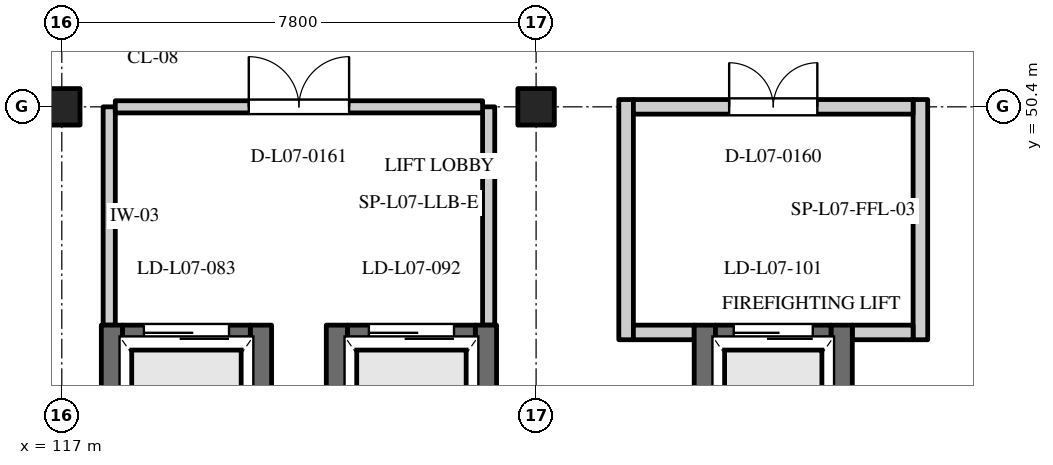
"""IFC4 building model, lengths in metres.
Left out: names, types, materials, properties, quantities, classifications, styles, units other than length and angle.
Written with IfcOpenShell. Run it as: python <this file> out.ifc"""

import sys

from ifc_helpers import new_model, si_unit, direction, frame, frame_2d, origin, origin_2d, place, context, subcontext, project, spatial, rectangle, extrude, element, fill, save


model = new_model("IFC4")
c1 = context("Model", 3, precision=1e-05, world=origin(), true_north=direction((0.0, 1.0)))
c2 = subcontext(c1, "Body", "Model", "MODEL_VIEW")
j1 = project(units=[si_unit("LENGTHUNIT", "METRE"), si_unit("PLANEANGLEUNIT", "RADIAN")], contexts=[c1])
p1 = place(None, origin())
s1 = spatial("IfcSite", under=j1, at=p1, CompositionType="ELEMENT")
p2 = place(p1, origin())
s2 = spatial("IfcBuilding", under=s1, at=p2, CompositionType="ELEMENT")
p3 = place(p2, frame((0.0, 0.0, 29.7)))
s3 = spatial("IfcBuildingStorey", under=s2, at=p3, CompositionType="ELEMENT", Elevation=29.7)
for number, where, z_axis, x_axis in (
    (1, (117.0, 50.4, 0.0), (0.0, 0.0, 1.0), (1.0, 0.0, 0.0)),
    (2, (124.8, 50.4, 0.0), (0.0, 0.0, 1.0), (1.0, 0.0, 0.0)),
):
    element("IfcColumn", number, at=place(p3, frame(where, z_axis=z_axis, x_axis=x_axis)), inside=s3, PredefinedType="COLUMN", context=c2, shape_type="SweptSolid", body=[
        extrude(rectangle(XDim=0.6, YDim=0.6, at=origin_2d()), origin(), (0.0, 0.0, 1.0), 4.2),
    ])
for number, where, z_axis, x_axis in (
    (3, (117.825, 42.76, 0.0), (0.0, 0.0, 1.0), (0.0, 1.0, 0.0)),
    (4, (120.275, 42.76, 0.0), (0.0, 0.0, 1.0), (0.0, 1.0, 0.0)),
):
    element("IfcWall", number, at=place(p3, frame(where, z_axis=z_axis, x_axis=x_axis)), inside=s3, PredefinedType="SHEAR", context=c2, shape_type="SweptSolid", body=[
        extrude(rectangle(XDim=4.05, YDim=0.35, at=frame_2d((2.025, 0.0))), origin(), (0.0, 0.0, 1.0), 3.9),
    ])
p4 = place(p3, frame((118.0, 46.635, 0.0), z_axis=(0.0, 0.0, 1.0), x_axis=(1.0, 0.0, 0.0)))
e5 = element("IfcWall", 5, at=p4, inside=s3, PredefinedType="SHEAR", context=c2, shape_type="SweptSolid", body=[
    extrude(rectangle(XDim=2.1, YDim=0.35, at=frame_2d((1.05, 0.0))), origin(), (0.0, 0.0, 1.0), 3.9),
])
p5 = place(p4, frame((0.35, 0.0, 0.0)))
e6 = element("IfcOpeningElement", 6, at=p5, cuts=e5, PredefinedType="OPENING", context=c2, shape_type="SweptSolid", body=[
    extrude(rectangle(XDim=1.4, YDim=2.2, at=frame_2d((0.7, 1.1))), frame((0.0, 0.187, 0.0), z_axis=(0.0, -1.0, 0.0), x_axis=(1.0, 0.0, 0.0)), (0.0, 0.0, 1.0), 0.374),
])
for number, where, z_axis, x_axis in (
    (7, (121.525, 42.76, 0.0), (0.0, 0.0, 1.0), (0.0, 1.0, 0.0)),
    (8, (123.975, 42.76, 0.0), (0.0, 0.0, 1.0), (0.0, 1.0, 0.0)),
):
    element("IfcWall", number, at=place(p3, frame(where, z_axis=z_axis, x_axis=x_axis)), inside=s3, PredefinedType="SHEAR", context=c2, shape_type="SweptSolid", body=[
        extrude(rectangle(XDim=4.05, YDim=0.35, at=frame_2d((2.025, 0.0))), origin(), (0.0, 0.0, 1.0), 3.9),
    ])
p6 = place(p3, frame((121.7, 46.635, 0.0), z_axis=(0.0, 0.0, 1.0), x_axis=(1.0, 0.0, 0.0)))
e9 = element("IfcWall", 9, at=p6, inside=s3, PredefinedType="SHEAR", context=c2, shape_type="SweptSolid", body=[
    extrude(rectangle(XDim=2.1, YDim=0.35, at=frame_2d((1.05, 0.0))), origin(), (0.0, 0.0, 1.0), 3.9),
])
p7 = place(p6, frame((0.35, 0.0, 0.0)))
e10 = element("IfcOpeningElement", 10, at=p7, cuts=e9, PredefinedType="OPENING", context=c2, shape_type="SweptSolid", body=[
    extrude(rectangle(XDim=1.4, YDim=2.2, at=frame_2d((0.7, 1.1))), frame((0.0, 0.187, 0.0), z_axis=(0.0, -1.0, 0.0), x_axis=(1.0, 0.0, 0.0)), (0.0, 0.0, 1.0), 0.374),
])
for number, where, z_axis, x_axis in (
    (11, (127.575, 43.06, 0.0), (0.0, 0.0, 1.0), (0.0, 1.0, 0.0)),
    (12, (129.825, 43.06, 0.0), (0.0, 0.0, 1.0), (0.0, 1.0, 0.0)),
):
    element("IfcWall", number, at=place(p3, frame(where, z_axis=z_axis, x_axis=x_axis)), inside=s3, PredefinedType="SHEAR", context=c2, shape_type="SweptSolid", body=[
        extrude(rectangle(XDim=3.75, YDim=0.35, at=frame_2d((1.875, 0.0))), origin(), (0.0, 0.0, 1.0), 3.9),
    ])
p8 = place(p3, frame((127.75, 46.635, 0.0), z_axis=(0.0, 0.0, 1.0), x_axis=(1.0, 0.0, 0.0)))
e13 = element("IfcWall", 13, at=p8, inside=s3, PredefinedType="SHEAR", context=c2, shape_type="SweptSolid", body=[
    extrude(rectangle(XDim=1.9, YDim=0.35, at=frame_2d((0.95, 0.0))), origin(), (0.0, 0.0, 1.0), 3.9),
])
p9 = place(p8, frame((0.3, 0.0, 0.0)))
e14 = element("IfcOpeningElement", 14, at=p9, cuts=e13, PredefinedType="OPENING", context=c2, shape_type="SweptSolid", body=[
    extrude(rectangle(XDim=1.3, YDim=2.2, at=frame_2d((0.65, 1.1))), frame((0.0, 0.187, 0.0), z_axis=(0.0, -1.0, 0.0), x_axis=(1.0, 0.0, 0.0)), (0.0, 0.0, 1.0), 0.374),
])
for number, where, z_axis, x_axis in (
    (15, (126.28, 46.57, 0.0), (0.0, 0.0, 1.0), (0.0, 1.0, 0.0)),
    (16, (131.12, 46.57, 0.0), (0.0, 0.0, 1.0), (0.0, 1.0, 0.0)),
):
    element("IfcWall", number, at=place(p3, frame(where, z_axis=z_axis, x_axis=x_axis)), inside=s3, PredefinedType="STANDARD", context=c2, shape_type="SweptSolid", body=[
        extrude(rectangle(XDim=3.95, YDim=0.24, at=frame_2d((1.975, 0.0))), origin(), (0.0, 0.0, 1.0), 3.4),
    ])
for number, where, z_axis, x_axis in (
    (17, (126.4, 46.69, 0.0), (0.0, 0.0, 1.0), (1.0, 0.0, 0.0)),
    (18, (130.0, 46.69, 0.0), (0.0, 0.0, 1.0), (1.0, 0.0, 0.0)),
):
    element("IfcWall", number, at=place(p3, frame(where, z_axis=z_axis, x_axis=x_axis)), inside=s3, PredefinedType="STANDARD", context=c2, shape_type="SweptSolid", body=[
        extrude(rectangle(XDim=1.0, YDim=0.24, at=frame_2d((0.5, 0.0))), origin(), (0.0, 0.0, 1.0), 3.4),
    ])
p10 = place(p3, frame((126.4, 50.4, 0.0), z_axis=(0.0, 0.0, 1.0), x_axis=(1.0, 0.0, 0.0)))
e19 = element("IfcWall", 19, at=p10, inside=s3, PredefinedType="STANDARD", context=c2, shape_type="SweptSolid", body=[
    extrude(rectangle(XDim=4.6, YDim=0.24, at=frame_2d((2.3, 0.0))), origin(), (0.0, 0.0, 1.0), 3.4),
])
p11 = place(p10, frame((1.575, 0.0, 0.0)))
e20 = element("IfcOpeningElement", 20, at=p11, cuts=e19, PredefinedType="OPENING", context=c2, shape_type="SweptSolid", body=[
    extrude(rectangle(XDim=1.45, YDim=2.2, at=frame_2d((0.725, 1.1))), frame((0.0, 0.132, 0.0), z_axis=(0.0, -1.0, 0.0), x_axis=(1.0, 0.0, 0.0)), (0.0, 0.0, 1.0), 0.264),
])
for number, where, z_axis, x_axis in (
    (21, (117.78, 46.81, 0.0), (0.0, 0.0, 1.0), (0.0, 1.0, 0.0)),
    (22, (124.02, 46.81, 0.0), (0.0, 0.0, 1.0), (0.0, 1.0, 0.0)),
):
    element("IfcWall", number, at=place(p3, frame(where, z_axis=z_axis, x_axis=x_axis)), inside=s3, PredefinedType="STANDARD", context=c2, shape_type="SweptSolid", body=[
        extrude(rectangle(XDim=3.59, YDim=0.2, at=frame_2d((1.795, 0.0))), origin(), (0.0, 0.0, 1.0), 3.4),
    ])
p12 = place(p3, frame((117.88, 50.4, 0.0), z_axis=(0.0, 0.0, 1.0), x_axis=(1.0, 0.0, 0.0)))
e23 = element("IfcWall", 23, at=p12, inside=s3, PredefinedType="STANDARD", context=c2, shape_type="SweptSolid", body=[
    extrude(rectangle(XDim=6.04, YDim=0.2, at=frame_2d((3.02, 0.0))), origin(), (0.0, 0.0, 1.0), 3.4),
])
p13 = place(p12, frame((2.195, 0.0, 0.0)))
e24 = element("IfcOpeningElement", 24, at=p13, cuts=e23, PredefinedType="OPENING", context=c2, shape_type="SweptSolid", body=[
    extrude(rectangle(XDim=1.65, YDim=2.25, at=frame_2d((0.825, 1.125))), frame((0.0, 0.112, 0.0), z_axis=(0.0, -1.0, 0.0), x_axis=(1.0, 0.0, 0.0)), (0.0, 0.0, 1.0), 0.224),
])
p14 = place(p5, origin())
e25 = element("IfcDoor", 25, at=p14, inside=s3, OperationType="SLIDING_TO_LEFT", PredefinedType="DOOR", context=c2, shape_type="SweptSolid", body=[
    extrude(rectangle(XDim=1.4, YDim=2.2, at=frame_2d((0.7, 1.1))), frame((0.0, 0.025, 0.0), z_axis=(0.0, -1.0, 0.0), x_axis=(1.0, 0.0, 0.0)), (0.0, 0.0, 1.0), 0.05),
])
fill(e6, e25)
p15 = place(p7, origin())
e26 = element("IfcDoor", 26, at=p15, inside=s3, OperationType="SLIDING_TO_LEFT", PredefinedType="DOOR", context=c2, shape_type="SweptSolid", body=[
    extrude(rectangle(XDim=1.4, YDim=2.2, at=frame_2d((0.7, 1.1))), frame((0.0, 0.025, 0.0), z_axis=(0.0, -1.0, 0.0), x_axis=(1.0, 0.0, 0.0)), (0.0, 0.0, 1.0), 0.05),
])
fill(e10, e26)
p16 = place(p9, origin())
e27 = element("IfcDoor", 27, at=p16, inside=s3, OperationType="SLIDING_TO_LEFT", PredefinedType="DOOR", context=c2, shape_type="SweptSolid", body=[
    extrude(rectangle(XDim=1.3, YDim=2.2, at=frame_2d((0.65, 1.1))), frame((0.0, 0.025, 0.0), z_axis=(0.0, -1.0, 0.0), x_axis=(1.0, 0.0, 0.0)), (0.0, 0.0, 1.0), 0.05),
])
fill(e14, e27)
p17 = place(p11, origin())
e28 = element("IfcDoor", 28, at=p17, inside=s3, OperationType="DOUBLE_DOOR_SINGLE_SWING", PredefinedType="DOOR", context=c2, shape_type="SweptSolid", body=[
    extrude(rectangle(XDim=1.45, YDim=2.2, at=frame_2d((0.725, 1.1))), frame((0.0, 0.025, 0.0), z_axis=(0.0, -1.0, 0.0), x_axis=(1.0, 0.0, 0.0)), (0.0, 0.0, 1.0), 0.05),
])
fill(e20, e28)
p18 = place(p13, origin())
e29 = element("IfcDoor", 29, at=p18, inside=s3, OperationType="DOUBLE_DOOR_SINGLE_SWING", PredefinedType="DOOR", context=c2, shape_type="SweptSolid", body=[
    extrude(rectangle(XDim=1.65, YDim=2.25, at=frame_2d((0.825, 1.125))), frame((0.0, 0.025, 0.0), z_axis=(0.0, -1.0, 0.0), x_axis=(1.0, 0.0, 0.0)), (0.0, 0.0, 1.0), 0.05),
])
fill(e24, e29)
save(model, sys.argv[1])
